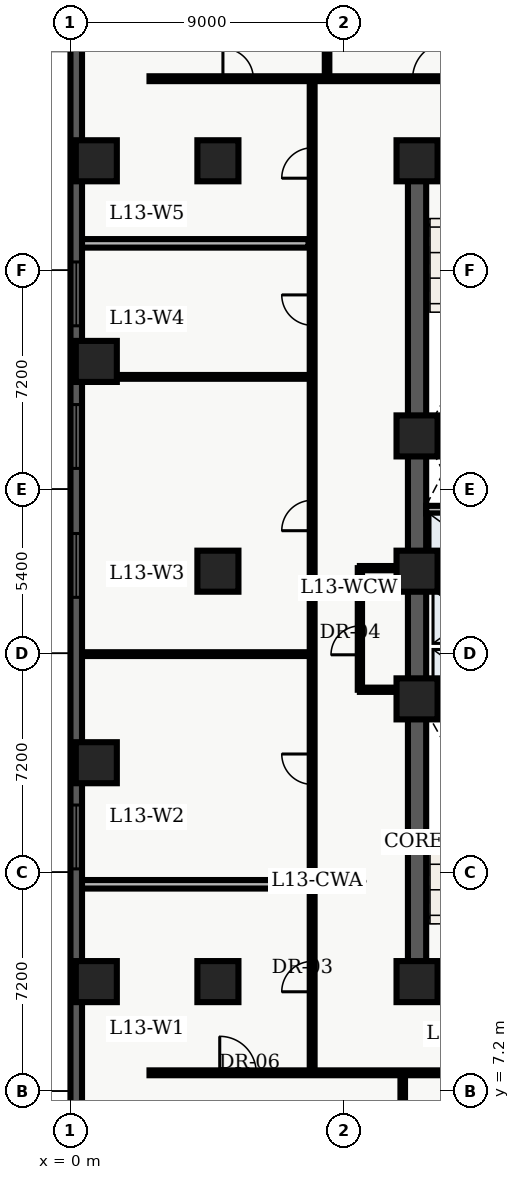
"""IFC4 building model, lengths in metres.
Left out: names, types, materials, properties, quantities, classifications, styles, units other than length and angle.
Written with IfcOpenShell. Run it as: python <this file> out.ifc"""

import sys

from ifc_helpers import new_model, entity, si_unit, converted_unit, direction, frame, origin_with_axes, origin_2d_with_axis, place, context, subcontext, project, spatial, polyline, rectangle, outline, extrude, element, fill, save


model = new_model("IFC4")
c1 = context("Model", 3, precision=1e-05, world=origin_with_axes(), true_north=direction((0.0, 1.0)))
c2 = subcontext(c1, "Body", "Model", "MODEL_VIEW")
j1 = project(units=[si_unit("LENGTHUNIT", "METRE"), converted_unit("PLANEANGLEUNIT", "DEGREE", entity("IfcPlaneAngleMeasure", 0.017), si_unit("PLANEANGLEUNIT", "RADIAN"), dimensions=[0, 0, 0, 0, 0, 0, 0])], contexts=[c1])
p1 = place(None, origin_with_axes())
s1 = spatial("IfcSite", under=j1, at=p1, CompositionType="ELEMENT")
p2 = place(p1, origin_with_axes())
s2 = spatial("IfcBuilding", under=s1, at=p2, CompositionType="ELEMENT")
p3 = place(p2, frame((0.0, 0.0, 56.1), z_axis=(0.0, 0.0, 1.0), x_axis=(1.0, 0.0, 0.0)))
s3 = spatial("IfcBuildingStorey", under=s2, at=p3, CompositionType="ELEMENT", Elevation=56.1)
p4 = place(p3, frame((11.4, 10.8, 0.0), z_axis=(0.0, 0.0, 1.0), x_axis=(0.0, 1.0, 0.0)))
e1 = element("IfcWall", 1, at=p4, inside=s3, PredefinedType="SHEAR", context=c2, shape_type="SweptSolid", body=[
    extrude(outline(polyline([(0.0, -0.3), (27.0, -0.3), (27.0, 0.3), (0.0, 0.3), (0.0, -0.3)])), origin_with_axes(), (0.0, 0.0, 1.0), 3.66),
])
p5 = place(p3, frame((11.4, 10.8, 0.0), z_axis=(0.0, 0.0, 1.0), x_axis=(1.0, 0.0, 0.0)))
e2 = element("IfcWall", 2, at=p5, inside=s3, PredefinedType="SHEAR", context=c2, shape_type="SweptSolid", body=[
    extrude(outline(polyline([(0.0, -0.3), (7.2, -0.3), (7.2, 0.3), (0.0, 0.3), (0.0, -0.3)])), origin_with_axes(), (0.0, 0.0, 1.0), 3.66),
])
p6 = place(p5, frame((2.625, 0.0, 0.0), z_axis=(0.0, 0.0, 1.0), x_axis=(1.0, 0.0, 0.0)))
e3 = element("IfcOpeningElement", 3, at=p6, cuts=e2, PredefinedType="OPENING", context=c2, shape_type="SweptSolid", body=[
    extrude(rectangle(XDim=1.05, YDim=0.62, at=origin_2d_with_axis()), origin_with_axes(), (0.0, 0.0, 1.0), 2.15),
])
p7 = place(p3, frame((11.4, 37.8, 0.0), z_axis=(0.0, 0.0, 1.0), x_axis=(1.0, 0.0, 0.0)))
e4 = element("IfcWall", 4, at=p7, inside=s3, PredefinedType="SHEAR", context=c2, shape_type="SweptSolid", body=[
    extrude(outline(polyline([(0.0, -0.3), (7.2, -0.3), (7.2, 0.3), (0.0, 0.3), (0.0, -0.3)])), origin_with_axes(), (0.0, 0.0, 1.0), 3.66),
])
p8 = place(p7, frame((2.625, 0.0, 0.0), z_axis=(0.0, 0.0, 1.0), x_axis=(1.0, 0.0, 0.0)))
e5 = element("IfcOpeningElement", 5, at=p8, cuts=e4, PredefinedType="OPENING", context=c2, shape_type="SweptSolid", body=[
    extrude(rectangle(XDim=1.05, YDim=0.62, at=origin_2d_with_axis()), origin_with_axes(), (0.0, 0.0, 1.0), 2.15),
])
for number, where, z_axis, x_axis in (
    (6, (11.7, 19.825, 0.0), (0.0, 0.0, 1.0), (1.0, 0.0, 0.0)),
    (7, (11.7, 28.775, 0.0), (0.0, 0.0, 1.0), (1.0, 0.0, 0.0)),
):
    element("IfcWall", number, at=place(p3, frame(where, z_axis=z_axis, x_axis=x_axis)), inside=s3, PredefinedType="SHEAR", context=c2, shape_type="SweptSolid", body=[
        extrude(outline(polyline([(0.0, -0.125), (6.6, -0.125), (6.6, 0.125), (0.0, 0.125), (0.0, -0.125)])), origin_with_axes(), (0.0, 0.0, 1.0), 3.66),
    ])
p9 = place(p3, frame((11.7, 24.1, 0.0), z_axis=(0.0, 0.0, 1.0), x_axis=(1.0, 0.0, 0.0)))
e8 = element("IfcWall", 8, at=p9, inside=s3, PredefinedType="SOLIDWALL", context=c2, shape_type="SweptSolid", body=[
    extrude(outline(polyline([(0.0, -0.125), (6.6, -0.125), (6.6, 0.125), (0.0, 0.125), (0.0, -0.125)])), origin_with_axes(), (0.0, 0.0, 1.0), 2.7),
])
p10 = place(p9, frame((3.75, 0.0, 0.0), z_axis=(0.0, 0.0, 1.0), x_axis=(1.0, 0.0, 0.0)))
e9 = element("IfcOpeningElement", 9, at=p10, cuts=e8, PredefinedType="OPENING", context=c2, shape_type="SweptSolid", body=[
    extrude(rectangle(XDim=0.9, YDim=0.27, at=origin_2d_with_axis()), origin_with_axes(), (0.0, 0.0, 1.0), 2.15),
])
p11 = place(p3, frame((11.7, 26.325, 0.0), z_axis=(0.0, 0.0, 1.0), x_axis=(1.0, 0.0, 0.0)))
e10 = element("IfcWall", 10, at=p11, inside=s3, PredefinedType="SOLIDWALL", context=c2, shape_type="SweptSolid", body=[
    extrude(outline(polyline([(0.0, -0.125), (6.6, -0.125), (6.6, 0.125), (0.0, 0.125), (0.0, -0.125)])), origin_with_axes(), (0.0, 0.0, 1.0), 2.7),
])
p12 = place(p11, frame((3.5, 0.0, 0.0), z_axis=(0.0, 0.0, 1.0), x_axis=(1.0, 0.0, 0.0)))
e11 = element("IfcOpeningElement", 11, at=p12, cuts=e10, PredefinedType="OPENING", context=c2, shape_type="SweptSolid", body=[
    extrude(rectangle(XDim=0.9, YDim=0.27, at=origin_2d_with_axis()), origin_with_axes(), (0.0, 0.0, 1.0), 2.15),
])
for number, where, z_axis, x_axis in (
    (12, (11.4, 10.8, 0.0), (0.0, 0.0, 1.0), (1.0, 0.0, 0.0)),
    (13, (11.4, 20.1, 0.0), (0.0, 0.0, 1.0), (1.0, 0.0, 0.0)),
    (14, (11.4, 24.3, 0.0), (0.0, 0.0, 1.0), (1.0, 0.0, 0.0)),
    (15, (11.4, 28.75, 0.0), (0.0, 0.0, 1.0), (1.0, 0.0, 0.0)),
    (16, (11.4, 37.8, 0.0), (0.0, 0.0, 1.0), (1.0, 0.0, 0.0)),
    (17, (4.85, 10.8, 0.0), (0.0, 0.0, 1.0), (1.0, 0.0, 0.0)),
    (18, (4.85, 24.3, 0.0), (0.0, 0.0, 1.0), (1.0, 0.0, 0.0)),
    (19, (4.85, 37.8, 0.0), (0.0, 0.0, 1.0), (1.0, 0.0, 0.0)),
    (20, (0.85, 10.8, 0.0), (0.0, 0.0, 1.0), (1.0, 0.0, 0.0)),
    (21, (0.85, 18.0, 0.0), (0.0, 0.0, 1.0), (1.0, 0.0, 0.0)),
    (22, (0.85, 31.2, 0.0), (0.0, 0.0, 1.0), (1.0, 0.0, 0.0)),
    (23, (0.85, 37.8, 0.0), (0.0, 0.0, 1.0), (1.0, 0.0, 0.0)),
):
    element("IfcColumn", number, at=place(p3, frame(where, z_axis=z_axis, x_axis=x_axis)), inside=s3, PredefinedType="COLUMN", context=c2, shape_type="SweptSolid", body=[
        extrude(rectangle(XDim=1.35, YDim=1.35, at=origin_2d_with_axis()), origin_with_axes(), (0.0, 0.0, 1.0), 3.9),
    ])
p13 = place(p3, frame((9.52, 20.4, 0.0), z_axis=(0.0, 0.0, 1.0), x_axis=(0.0, 1.0, 0.0)))
e24 = element("IfcWall", 24, at=p13, inside=s3, PredefinedType="PARTITIONING", context=c2, shape_type="SweptSolid", body=[
    extrude(outline(polyline([(0.0, -0.07), (4.0, -0.07), (4.0, 0.07), (0.0, 0.07), (0.0, -0.07)])), origin_with_axes(), (0.0, 0.0, 1.0), 2.7),
])
p14 = place(p13, frame((1.625, 0.0, 0.0), z_axis=(0.0, 0.0, 1.0), x_axis=(1.0, 0.0, 0.0)))
e25 = element("IfcOpeningElement", 25, at=p14, cuts=e24, PredefinedType="OPENING", context=c2, shape_type="SweptSolid", body=[
    extrude(rectangle(XDim=0.95, YDim=0.16, at=origin_2d_with_axis()), origin_with_axes(), (0.0, 0.0, 1.0), 2.15),
])
for number, where, z_axis, x_axis in (
    (26, (9.52, 20.4, 0.0), (0.0, 0.0, 1.0), (1.0, 0.0, 0.0)),
    (27, (9.52, 24.4, 0.0), (0.0, 0.0, 1.0), (1.0, 0.0, 0.0)),
):
    element("IfcWall", number, at=place(p3, frame(where, z_axis=z_axis, x_axis=x_axis)), inside=s3, PredefinedType="PARTITIONING", context=c2, shape_type="SweptSolid", body=[
        extrude(outline(polyline([(0.0, -0.07), (1.58, -0.07), (1.58, 0.07), (0.0, 0.07), (0.0, -0.07)])), origin_with_axes(), (0.0, 0.0, 1.0), 2.7),
    ])
p15 = place(p3, frame((2.6, 7.8, 0.0), z_axis=(0.0, 0.0, 1.0), x_axis=(1.0, 0.0, 0.0)))
e28 = element("IfcWall", 28, at=p15, inside=s3, PredefinedType="PARTITIONING", context=c2, shape_type="SweptSolid", body=[
    extrude(outline(polyline([(0.0, -0.08), (18.55, -0.08), (18.55, 0.08), (0.0, 0.08), (0.0, -0.08)])), origin_with_axes(), (0.0, 0.0, 1.0), 2.7),
])
p16 = place(p15, frame((2.91, 0.0, 0.0), z_axis=(0.0, 0.0, 1.0), x_axis=(1.0, 0.0, 0.0)))
e29 = element("IfcOpeningElement", 29, at=p16, cuts=e28, PredefinedType="OPENING", context=c2, shape_type="SweptSolid", body=[
    extrude(rectangle(XDim=1.2, YDim=0.18, at=origin_2d_with_axis()), origin_with_axes(), (0.0, 0.0, 1.0), 2.2),
])
p17 = place(p15, frame((13.415, 0.0, 0.0), z_axis=(0.0, 0.0, 1.0), x_axis=(1.0, 0.0, 0.0)))
e30 = element("IfcOpeningElement", 30, at=p17, cuts=e28, PredefinedType="OPENING", context=c2, shape_type="SweptSolid", body=[
    extrude(rectangle(XDim=1.0, YDim=0.18, at=origin_2d_with_axis()), origin_with_axes(), (0.0, 0.0, 1.0), 2.15),
])
p18 = place(p3, frame((2.6, 40.5, 0.0), z_axis=(0.0, 0.0, 1.0), x_axis=(1.0, 0.0, 0.0)))
e31 = element("IfcWall", 31, at=p18, inside=s3, PredefinedType="PARTITIONING", context=c2, shape_type="SweptSolid", body=[
    extrude(outline(polyline([(0.0, -0.08), (18.65, -0.08), (18.65, 0.08), (0.0, 0.08), (0.0, -0.08)])), origin_with_axes(), (0.0, 0.0, 1.0), 2.7),
])
p19 = place(p18, frame((2.915, 0.0, 0.0), z_axis=(0.0, 0.0, 1.0), x_axis=(1.0, 0.0, 0.0)))
e32 = element("IfcOpeningElement", 32, at=p19, cuts=e31, PredefinedType="OPENING", context=c2, shape_type="SweptSolid", body=[
    extrude(rectangle(XDim=1.0, YDim=0.18, at=origin_2d_with_axis()), origin_with_axes(), (0.0, 0.0, 1.0), 2.15),
])
p20 = place(p18, frame((9.254, 0.0, 0.0), z_axis=(0.0, 0.0, 1.0), x_axis=(1.0, 0.0, 0.0)))
e33 = element("IfcOpeningElement", 33, at=p20, cuts=e31, PredefinedType="OPENING", context=c2, shape_type="SweptSolid", body=[
    extrude(rectangle(XDim=1.2, YDim=0.18, at=origin_2d_with_axis()), origin_with_axes(), (0.0, 0.0, 1.0), 2.2),
])
p21 = place(p18, frame((14.543, 0.0, 0.0), z_axis=(0.0, 0.0, 1.0), x_axis=(1.0, 0.0, 0.0)))
e34 = element("IfcOpeningElement", 34, at=p21, cuts=e31, PredefinedType="OPENING", context=c2, shape_type="SweptSolid", body=[
    extrude(rectangle(XDim=1.0, YDim=0.18, at=origin_2d_with_axis()), origin_with_axes(), (0.0, 0.0, 1.0), 2.15),
])
p22 = place(p3, frame((7.95, 7.8, 0.0), z_axis=(0.0, 0.0, 1.0), x_axis=(0.0, 1.0, 0.0)))
e35 = element("IfcWall", 35, at=p22, inside=s3, PredefinedType="PARTITIONING", context=c2, shape_type="SweptSolid", body=[
    extrude(outline(polyline([(0.0, -0.08), (32.7, -0.08), (32.7, 0.08), (0.0, 0.08), (0.0, -0.08)])), origin_with_axes(), (0.0, 0.0, 1.0), 2.7),
])
p23 = place(p22, frame((3.166, 0.0, 0.0), z_axis=(0.0, 0.0, 1.0), x_axis=(1.0, 0.0, 0.0)))
e36 = element("IfcOpeningElement", 36, at=p23, cuts=e35, PredefinedType="OPENING", context=c2, shape_type="SweptSolid", body=[
    extrude(rectangle(XDim=1.0, YDim=0.18, at=origin_2d_with_axis()), origin_with_axes(), (0.0, 0.0, 1.0), 2.15),
])
p24 = place(p22, frame((9.986, 0.0, 0.0), z_axis=(0.0, 0.0, 1.0), x_axis=(1.0, 0.0, 0.0)))
e37 = element("IfcOpeningElement", 37, at=p24, cuts=e35, PredefinedType="OPENING", context=c2, shape_type="SweptSolid", body=[
    extrude(rectangle(XDim=1.0, YDim=0.18, at=origin_2d_with_axis()), origin_with_axes(), (0.0, 0.0, 1.0), 2.15),
])
p25 = place(p22, frame((18.332, 0.0, 0.0), z_axis=(0.0, 0.0, 1.0), x_axis=(1.0, 0.0, 0.0)))
e38 = element("IfcOpeningElement", 38, at=p25, cuts=e35, PredefinedType="OPENING", context=c2, shape_type="SweptSolid", body=[
    extrude(rectangle(XDim=1.0, YDim=0.18, at=origin_2d_with_axis()), origin_with_axes(), (0.0, 0.0, 1.0), 2.15),
])
p26 = place(p22, frame((25.088, 0.0, 0.0), z_axis=(0.0, 0.0, 1.0), x_axis=(1.0, 0.0, 0.0)))
e39 = element("IfcOpeningElement", 39, at=p26, cuts=e35, PredefinedType="OPENING", context=c2, shape_type="SweptSolid", body=[
    extrude(rectangle(XDim=1.0, YDim=0.18, at=origin_2d_with_axis()), origin_with_axes(), (0.0, 0.0, 1.0), 2.15),
])
p27 = place(p22, frame((29.927, 0.0, 0.0), z_axis=(0.0, 0.0, 1.0), x_axis=(1.0, 0.0, 0.0)))
e40 = element("IfcOpeningElement", 40, at=p27, cuts=e35, PredefinedType="OPENING", context=c2, shape_type="SweptSolid", body=[
    extrude(rectangle(XDim=1.0, YDim=0.18, at=origin_2d_with_axis()), origin_with_axes(), (0.0, 0.0, 1.0), 2.15),
])
p28 = place(p3, frame((0.375, 14.001, 0.0), z_axis=(0.0, 0.0, 1.0), x_axis=(1.0, 0.0, 0.0)))
e41 = element("IfcWall", 41, at=p28, inside=s3, PredefinedType="PARTITIONING", context=c2, shape_type="SweptSolid", body=[
    extrude(outline(polyline([(0.0, -0.14), (7.455, -0.14), (7.455, 0.14), (0.0, 0.14), (0.0, -0.14)])), origin_with_axes(), (0.0, 0.0, 1.0), 2.7),
])
for number, where, z_axis, x_axis in (
    (42, (0.375, 21.572, 0.0), (0.0, 0.0, 1.0), (1.0, 0.0, 0.0)),
    (43, (0.375, 30.692, 0.0), (0.0, 0.0, 1.0), (1.0, 0.0, 0.0)),
):
    element("IfcWall", number, at=place(p3, frame(where, z_axis=z_axis, x_axis=x_axis)), inside=s3, PredefinedType="PARTITIONING", context=c2, shape_type="SweptSolid", body=[
        extrude(outline(polyline([(0.0, -0.062), (7.455, -0.062), (7.455, 0.062), (0.0, 0.062), (0.0, -0.062)])), origin_with_axes(), (0.0, 0.0, 1.0), 2.7),
    ])
p29 = place(p3, frame((0.375, 35.084, 0.0), z_axis=(0.0, 0.0, 1.0), x_axis=(1.0, 0.0, 0.0)))
e44 = element("IfcWall", 44, at=p29, inside=s3, PredefinedType="PARTITIONING", context=c2, shape_type="SweptSolid", body=[
    extrude(outline(polyline([(0.0, -0.14), (7.455, -0.14), (7.455, 0.14), (0.0, 0.14), (0.0, -0.14)])), origin_with_axes(), (0.0, 0.0, 1.0), 2.7),
])
p30 = place(p3, frame((10.929, 0.36, 0.0), z_axis=(0.0, 0.0, 1.0), x_axis=(0.0, 1.0, 0.0)))
e45 = element("IfcWall", 45, at=p30, inside=s3, PredefinedType="PARTITIONING", context=c2, shape_type="SweptSolid", body=[
    extrude(outline(polyline([(0.0, -0.075), (7.34, -0.075), (7.34, 0.075), (0.0, 0.075), (0.0, -0.075)])), origin_with_axes(), (0.0, 0.0, 1.0), 2.7),
])
p31 = place(p3, frame((8.44, 40.6, 0.0), z_axis=(0.0, 0.0, 1.0), x_axis=(0.0, 1.0, 0.0)))
e46 = element("IfcWall", 46, at=p31, inside=s3, PredefinedType="PARTITIONING", context=c2, shape_type="SweptSolid", body=[
    extrude(outline(polyline([(0.0, -0.075), (7.64, -0.075), (7.64, 0.075), (0.0, 0.075), (0.0, -0.075)])), origin_with_axes(), (0.0, 0.0, 1.0), 2.7),
])
p32 = place(p3, frame((0.19, 2.78, 0.0), z_axis=(0.0, 0.0, 1.0), x_axis=(0.0, 1.0, 0.0)))
e47 = element("IfcWall", 47, at=p32, inside=s3, PredefinedType="SOLIDWALL", context=c2, shape_type="SweptSolid", body=[
    extrude(outline(polyline([(0.0, -0.19), (43.42, -0.19), (43.42, 0.19), (0.0, 0.19), (0.0, -0.19)])), origin_with_axes(), (0.0, 0.0, 1.0), 3.66),
])
p33 = place(p32, frame((2.946, 0.0, 0.45), z_axis=(0.0, 0.0, 1.0), x_axis=(1.0, 0.0, 0.0)))
e48 = element("IfcOpeningElement", 48, at=p33, cuts=e47, PredefinedType="OPENING", context=c2, shape_type="SweptSolid", body=[
    extrude(rectangle(XDim=2.1, YDim=0.4, at=origin_2d_with_axis()), origin_with_axes(), (0.0, 0.0, 1.0), 2.2),
])
p34 = place(p32, frame((12.778, 0.0, 0.45), z_axis=(0.0, 0.0, 1.0), x_axis=(1.0, 0.0, 0.0)))
e49 = element("IfcOpeningElement", 49, at=p34, cuts=e47, PredefinedType="OPENING", context=c2, shape_type="SweptSolid", body=[
    extrude(rectangle(XDim=2.1, YDim=0.4, at=origin_2d_with_axis()), origin_with_axes(), (0.0, 0.0, 1.0), 2.2),
])
p35 = place(p32, frame((21.71, 0.0, 0.45), z_axis=(0.0, 0.0, 1.0), x_axis=(1.0, 0.0, 0.0)))
e50 = element("IfcOpeningElement", 50, at=p35, cuts=e47, PredefinedType="OPENING", context=c2, shape_type="SweptSolid", body=[
    extrude(rectangle(XDim=2.1, YDim=0.4, at=origin_2d_with_axis()), origin_with_axes(), (0.0, 0.0, 1.0), 2.2),
])
p36 = place(p32, frame((25.951, 0.0, 0.45), z_axis=(0.0, 0.0, 1.0), x_axis=(1.0, 0.0, 0.0)))
e51 = element("IfcOpeningElement", 51, at=p36, cuts=e47, PredefinedType="OPENING", context=c2, shape_type="SweptSolid", body=[
    extrude(rectangle(XDim=2.1, YDim=0.4, at=origin_2d_with_axis()), origin_with_axes(), (0.0, 0.0, 1.0), 2.2),
])
p37 = place(p32, frame((30.642, 0.0, 0.45), z_axis=(0.0, 0.0, 1.0), x_axis=(1.0, 0.0, 0.0)))
e52 = element("IfcOpeningElement", 52, at=p37, cuts=e47, PredefinedType="OPENING", context=c2, shape_type="SweptSolid", body=[
    extrude(rectangle(XDim=2.1, YDim=0.4, at=origin_2d_with_axis()), origin_with_axes(), (0.0, 0.0, 1.0), 2.2),
])
p38 = place(p32, frame((40.024, 0.0, 0.45), z_axis=(0.0, 0.0, 1.0), x_axis=(1.0, 0.0, 0.0)))
e53 = element("IfcOpeningElement", 53, at=p38, cuts=e47, PredefinedType="OPENING", context=c2, shape_type="SweptSolid", body=[
    extrude(rectangle(XDim=2.1, YDim=0.4, at=origin_2d_with_axis()), origin_with_axes(), (0.0, 0.0, 1.0), 2.2),
])
p39 = place(p13, frame((1.625, 0.0, 0.0), z_axis=(0.0, 0.0, 1.0), x_axis=(1.0, 0.0, 0.0)))
e54 = element("IfcDoor", 54, at=p39, inside=s3, OperationType="SINGLE_SWING_LEFT", PredefinedType="DOOR", context=c2, shape_type="SweptSolid", body=[
    extrude(rectangle(XDim=0.95, YDim=0.084, at=origin_2d_with_axis()), origin_with_axes(), (0.0, 0.0, 1.0), 2.15),
])
fill(e25, e54)
p40 = place(p22, frame((3.166, 0.0, 0.0), z_axis=(0.0, 0.0, 1.0), x_axis=(1.0, 0.0, 0.0)))
e55 = element("IfcDoor", 55, at=p40, inside=s3, OperationType="SINGLE_SWING_LEFT", PredefinedType="DOOR", context=c2, shape_type="SweptSolid", body=[
    extrude(rectangle(XDim=1.0, YDim=0.09, at=origin_2d_with_axis()), origin_with_axes(), (0.0, 0.0, 1.0), 2.15),
])
fill(e36, e55)
p41 = place(p22, frame((9.986, 0.0, 0.0), z_axis=(0.0, 0.0, 1.0), x_axis=(1.0, 0.0, 0.0)))
e56 = element("IfcDoor", 56, at=p41, inside=s3, OperationType="SINGLE_SWING_RIGHT", PredefinedType="DOOR", context=c2, shape_type="SweptSolid", body=[
    extrude(rectangle(XDim=1.0, YDim=0.09, at=origin_2d_with_axis()), origin_with_axes(), (0.0, 0.0, 1.0), 2.15),
])
fill(e37, e56)
p42 = place(p22, frame((18.332, 0.0, 0.0), z_axis=(0.0, 0.0, 1.0), x_axis=(1.0, 0.0, 0.0)))
e57 = element("IfcDoor", 57, at=p42, inside=s3, OperationType="SINGLE_SWING_LEFT", PredefinedType="DOOR", context=c2, shape_type="SweptSolid", body=[
    extrude(rectangle(XDim=1.0, YDim=0.09, at=origin_2d_with_axis()), origin_with_axes(), (0.0, 0.0, 1.0), 2.15),
])
fill(e38, e57)
p43 = place(p22, frame((25.088, 0.0, 0.0), z_axis=(0.0, 0.0, 1.0), x_axis=(1.0, 0.0, 0.0)))
e58 = element("IfcDoor", 58, at=p43, inside=s3, OperationType="SINGLE_SWING_RIGHT", PredefinedType="DOOR", context=c2, shape_type="SweptSolid", body=[
    extrude(rectangle(XDim=1.0, YDim=0.09, at=origin_2d_with_axis()), origin_with_axes(), (0.0, 0.0, 1.0), 2.15),
])
fill(e39, e58)
p44 = place(p22, frame((29.927, 0.0, 0.0), z_axis=(0.0, 0.0, 1.0), x_axis=(1.0, 0.0, 0.0)))
e59 = element("IfcDoor", 59, at=p44, inside=s3, OperationType="SINGLE_SWING_LEFT", PredefinedType="DOOR", context=c2, shape_type="SweptSolid", body=[
    extrude(rectangle(XDim=1.0, YDim=0.09, at=origin_2d_with_axis()), origin_with_axes(), (0.0, 0.0, 1.0), 2.15),
])
fill(e40, e59)
p45 = place(p15, frame((2.91, 0.0, 0.0), z_axis=(0.0, 0.0, 1.0), x_axis=(1.0, 0.0, 0.0)))
e60 = element("IfcDoor", 60, at=p45, inside=s3, OperationType="SINGLE_SWING_LEFT", PredefinedType="DOOR", context=c2, shape_type="SweptSolid", body=[
    extrude(rectangle(XDim=1.2, YDim=0.09, at=origin_2d_with_axis()), origin_with_axes(), (0.0, 0.0, 1.0), 2.2),
])
fill(e29, e60)
p46 = place(p18, frame((2.915, 0.0, 0.0), z_axis=(0.0, 0.0, 1.0), x_axis=(1.0, 0.0, 0.0)))
e61 = element("IfcDoor", 61, at=p46, inside=s3, OperationType="SINGLE_SWING_LEFT", PredefinedType="DOOR", context=c2, shape_type="SweptSolid", body=[
    extrude(rectangle(XDim=1.0, YDim=0.09, at=origin_2d_with_axis()), origin_with_axes(), (0.0, 0.0, 1.0), 2.15),
])
fill(e32, e61)
p47 = place(p18, frame((9.254, 0.0, 0.0), z_axis=(0.0, 0.0, 1.0), x_axis=(1.0, 0.0, 0.0)))
e62 = element("IfcDoor", 62, at=p47, inside=s3, OperationType="SINGLE_SWING_RIGHT", PredefinedType="DOOR", context=c2, shape_type="SweptSolid", body=[
    extrude(rectangle(XDim=1.2, YDim=0.09, at=origin_2d_with_axis()), origin_with_axes(), (0.0, 0.0, 1.0), 2.2),
])
fill(e33, e62)
p48 = place(p32, frame((12.778, 0.0, 0.45), z_axis=(0.0, 0.0, 1.0), x_axis=(1.0, 0.0, 0.0)))
e63 = element("IfcWindow", 63, at=p48, inside=s3, PredefinedType="WINDOW", context=c2, shape_type="SweptSolid", body=[
    extrude(rectangle(XDim=2.1, YDim=0.09, at=origin_2d_with_axis()), origin_with_axes(), (0.0, 0.0, 1.0), 2.2),
])
fill(e49, e63)
p49 = place(p32, frame((21.71, 0.0, 0.45), z_axis=(0.0, 0.0, 1.0), x_axis=(1.0, 0.0, 0.0)))
e64 = element("IfcWindow", 64, at=p49, inside=s3, PredefinedType="WINDOW", context=c2, shape_type="SweptSolid", body=[
    extrude(rectangle(XDim=2.1, YDim=0.09, at=origin_2d_with_axis()), origin_with_axes(), (0.0, 0.0, 1.0), 2.2),
])
fill(e50, e64)
p50 = place(p32, frame((25.951, 0.0, 0.45), z_axis=(0.0, 0.0, 1.0), x_axis=(1.0, 0.0, 0.0)))
e65 = element("IfcWindow", 65, at=p50, inside=s3, PredefinedType="WINDOW", context=c2, shape_type="SweptSolid", body=[
    extrude(rectangle(XDim=2.1, YDim=0.09, at=origin_2d_with_axis()), origin_with_axes(), (0.0, 0.0, 1.0), 2.2),
])
fill(e51, e65)
p51 = place(p32, frame((30.642, 0.0, 0.45), z_axis=(0.0, 0.0, 1.0), x_axis=(1.0, 0.0, 0.0)))
e66 = element("IfcWindow", 66, at=p51, inside=s3, PredefinedType="WINDOW", context=c2, shape_type="SweptSolid", body=[
    extrude(rectangle(XDim=2.1, YDim=0.09, at=origin_2d_with_axis()), origin_with_axes(), (0.0, 0.0, 1.0), 2.2),
])
fill(e52, e66)
save(model, sys.argv[1])
